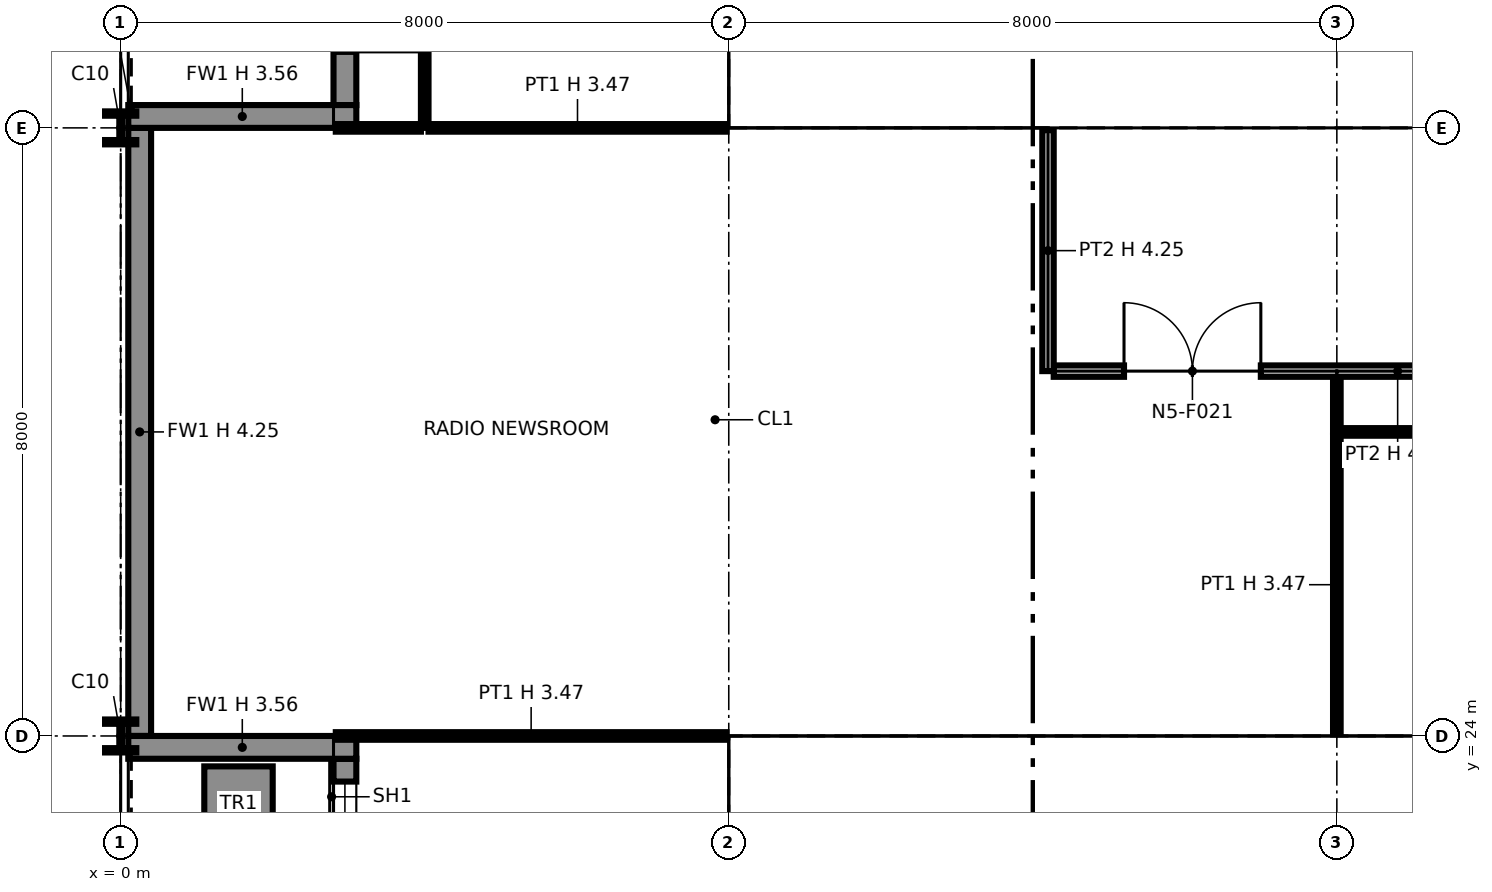
"""IFC4 building model, lengths in metres.
Left out: names, types, materials, properties, quantities, classifications, styles, units other than length and angle.
Written with IfcOpenShell. Run it as: python <this file> out.ifc"""

import sys

from ifc_helpers import new_model, si_unit, direction, frame, frame_2d, origin, origin_2d, place, context, subcontext, project, spatial, polyline, rectangle, i_section, outline, extrude, element, fill, save


model = new_model("IFC4")
c1 = context("Model", 3, precision=1e-05, world=origin(), true_north=direction((0.0, 1.0)))
c2 = subcontext(c1, "Body", "Model", "MODEL_VIEW")
j1 = project(units=[si_unit("LENGTHUNIT", "METRE"), si_unit("PLANEANGLEUNIT", "RADIAN")], contexts=[c1])
p1 = place(None, origin())
s1 = spatial("IfcSite", under=j1, at=p1, CompositionType="ELEMENT")
p2 = place(p1, origin())
s2 = spatial("IfcBuilding", under=s1, at=p2, CompositionType="ELEMENT")
p3 = place(p2, frame((0.0, 0.0, 92.0)))
s3 = spatial("IfcBuildingStorey", under=s2, at=p3, CompositionType="ELEMENT", Elevation=92.0)
for number, where, z_axis, x_axis in (
    (1, (0.0, 24.0, 0.0), (0.0, 0.0, 1.0), (1.0, 0.0, 0.0)),
    (2, (0.0, 32.0, 0.0), (0.0, 0.0, 1.0), (1.0, 0.0, 0.0)),
    (3, (8.0, 24.0, 0.0), (0.0, 0.0, 1.0), (1.0, 0.0, 0.0)),
):
    element("IfcColumn", number, at=place(p3, frame(where, z_axis=z_axis, x_axis=x_axis)), inside=s3, PredefinedType="COLUMN", context=c2, shape_type="SweptSolid", body=[
        extrude(i_section(OverallWidth=0.411, OverallDepth=0.434, WebThickness=0.036, FlangeThickness=0.057, at=origin_2d()), origin(), (0.0, 0.0, 1.0), 4.25),
    ])
p4 = place(p3, frame((8.0, 32.0, 0.0), z_axis=(0.0, 0.0, 1.0), x_axis=(1.0, 0.0, 0.0)))
e4 = element("IfcColumn", 4, at=p4, inside=s3, PredefinedType="COLUMN", context=c2, shape_type="SweptSolid", body=[
    extrude(i_section(OverallWidth=0.394, OverallDepth=0.376, WebThickness=0.017, FlangeThickness=0.028, at=origin_2d()), origin(), (0.0, 0.0, 1.0), 4.25),
])
p5 = place(p3, frame((16.0, 24.0, 0.0), z_axis=(0.0, 0.0, 1.0), x_axis=(1.0, 0.0, 0.0)))
e5 = element("IfcColumn", 5, at=p5, inside=s3, PredefinedType="COLUMN", context=c2, shape_type="SweptSolid", body=[
    extrude(i_section(OverallWidth=0.411, OverallDepth=0.434, WebThickness=0.036, FlangeThickness=0.057, at=origin_2d()), origin(), (0.0, 0.0, 1.0), 4.25),
])
p6 = place(p3, frame((16.0, 32.0, 0.0), z_axis=(0.0, 0.0, 1.0), x_axis=(1.0, 0.0, 0.0)))
e6 = element("IfcColumn", 6, at=p6, inside=s3, PredefinedType="COLUMN", context=c2, shape_type="SweptSolid", body=[
    extrude(i_section(OverallWidth=0.394, OverallDepth=0.376, WebThickness=0.017, FlangeThickness=0.028, at=origin_2d()), origin(), (0.0, 0.0, 1.0), 4.25),
])
p7 = place(p3, frame((2.95, 39.7, 0.0), z_axis=(0.0, 0.0, 1.0), x_axis=(0.0, -1.0, 0.0)))
e7 = element("IfcWall", 7, at=p7, inside=s3, PredefinedType="SOLIDWALL", context=c2, shape_type="SweptSolid", body=[
    extrude(rectangle(XDim=7.4, YDim=0.3, at=frame_2d((3.7, 0.0))), origin(), (0.0, 0.0, 1.0), 4.25),
])
p8 = place(p7, frame((0.3, 0.0, 0.9)))
e8 = element("IfcOpeningElement", 8, at=p8, cuts=e7, PredefinedType="OPENING", context=c2, shape_type="SweptSolid", body=[
    extrude(rectangle(XDim=2.8, YDim=2.2, at=frame_2d((1.4, 1.1))), frame((0.0, 0.16, 0.0), z_axis=(0.0, -1.0, 0.0), x_axis=(1.0, 0.0, 0.0)), (0.0, 0.0, 1.0), 0.32),
])
p9 = place(p7, frame((4.7, 0.0, 0.0)))
e9 = element("IfcOpeningElement", 9, at=p9, cuts=e7, PredefinedType="OPENING", context=c2, shape_type="SweptSolid", body=[
    extrude(rectangle(XDim=2.0, YDim=2.4, at=frame_2d((1.0, 1.2))), frame((0.0, 0.16, 0.0), z_axis=(0.0, -1.0, 0.0), x_axis=(1.0, 0.0, 0.0)), (0.0, 0.0, 1.0), 0.32),
])
p10 = place(p3, frame((0.1, 32.15, 0.0), z_axis=(0.0, 0.0, 1.0), x_axis=(1.0, 0.0, 0.0)))
e10 = element("IfcWall", 10, at=p10, inside=s3, PredefinedType="SOLIDWALL", context=c2, shape_type="SweptSolid", body=[
    extrude(rectangle(XDim=3.0, YDim=0.3, at=frame_2d((1.5, 0.0))), origin(), (0.0, 0.0, 1.0), 3.556),
])
p11 = place(p3, frame((0.25, 32.0, 0.0), z_axis=(0.0, 0.0, 1.0), x_axis=(0.0, -1.0, 0.0)))
e11 = element("IfcWall", 11, at=p11, inside=s3, PredefinedType="SOLIDWALL", context=c2, shape_type="SweptSolid", body=[
    extrude(rectangle(XDim=8.0, YDim=0.3, at=frame_2d((4.0, 0.0))), origin(), (0.0, 0.0, 1.0), 4.25),
])
p12 = place(p3, frame((2.95, 23.7, 0.0), z_axis=(0.0, 0.0, 1.0), x_axis=(0.0, -1.0, 0.0)))
e12 = element("IfcWall", 12, at=p12, inside=s3, PredefinedType="SOLIDWALL", context=c2, shape_type="SweptSolid", body=[
    extrude(rectangle(XDim=7.4, YDim=0.3, at=frame_2d((3.7, 0.0))), origin(), (0.0, 0.0, 1.0), 4.25),
])
p13 = place(p12, frame((0.3, 0.0, 0.9)))
e13 = element("IfcOpeningElement", 13, at=p13, cuts=e12, PredefinedType="OPENING", context=c2, shape_type="SweptSolid", body=[
    extrude(rectangle(XDim=2.8, YDim=2.2, at=frame_2d((1.4, 1.1))), frame((0.0, 0.16, 0.0), z_axis=(0.0, -1.0, 0.0), x_axis=(1.0, 0.0, 0.0)), (0.0, 0.0, 1.0), 0.32),
])
p14 = place(p12, frame((4.7, 0.0, 0.0)))
e14 = element("IfcOpeningElement", 14, at=p14, cuts=e12, PredefinedType="OPENING", context=c2, shape_type="SweptSolid", body=[
    extrude(rectangle(XDim=2.0, YDim=2.4, at=frame_2d((1.0, 1.2))), frame((0.0, 0.16, 0.0), z_axis=(0.0, -1.0, 0.0), x_axis=(1.0, 0.0, 0.0)), (0.0, 0.0, 1.0), 0.32),
])
p15 = place(p3, frame((0.1, 23.85, 0.0), z_axis=(0.0, 0.0, 1.0), x_axis=(1.0, 0.0, 0.0)))
e15 = element("IfcWall", 15, at=p15, inside=s3, PredefinedType="SOLIDWALL", context=c2, shape_type="SweptSolid", body=[
    extrude(rectangle(XDim=3.0, YDim=0.3, at=frame_2d((1.5, 0.0))), origin(), (0.0, 0.0, 1.0), 3.556),
])
p16 = place(p3, frame((1.55, 23.6, 0.0), z_axis=(0.0, 0.0, 1.0), x_axis=(0.0, -1.0, 0.0)))
e16 = element("IfcWall", 16, at=p16, inside=s3, PredefinedType="SOLIDWALL", context=c2, shape_type="SweptSolid", body=[
    extrude(rectangle(XDim=3.2, YDim=0.9, at=frame_2d((1.6, 0.0))), origin(), (0.0, 0.0, 1.0), 0.6),
])
p17 = place(p3, frame((8.75, 8.85, 0.0), z_axis=(0.0, 0.0, 1.0), x_axis=(0.0, 1.0, 0.0)))
e17 = element("IfcWall", 17, at=p17, inside=s3, PredefinedType="PARTITIONING", context=c2, shape_type="SweptSolid", body=[
    extrude(outline(polyline([(0.0, 0.0), (14.3, 0.0), (14.3, 4.25), (10.231, 4.25), (10.23, 3.789), (10.07, 3.789), (10.069, 4.25), (7.27, 4.25), (7.269, 3.632), (7.031, 3.632), (7.031, 4.25), (0.0, 4.25), (0.0, 0.0)])), frame((0.0, 0.1, 0.0), z_axis=(0.0, -1.0, 0.0), x_axis=(1.0, 0.0, 0.0)), (0.0, 0.0, 1.0), 0.2),
])
p18 = place(p17, frame((8.3, 0.0, 0.0)))
e18 = element("IfcOpeningElement", 18, at=p18, cuts=e17, PredefinedType="OPENING", context=c2, shape_type="SweptSolid", body=[
    extrude(rectangle(XDim=1.8, YDim=2.1, at=frame_2d((0.9, 1.05))), frame((0.0, 0.11, 0.0), z_axis=(0.0, -1.0, 0.0), x_axis=(1.0, 0.0, 0.0)), (0.0, 0.0, 1.0), 0.22),
])
p19 = place(p3, frame((8.65, 23.25, 0.0), z_axis=(0.0, 0.0, 1.0), x_axis=(1.0, 0.0, 0.0)))
e19 = element("IfcWall", 19, at=p19, inside=s3, PredefinedType="PARTITIONING", context=c2, shape_type="SweptSolid", body=[
    extrude(outline(polyline([(0.0, 0.0), (14.7, 0.0), (14.7, 4.25), (7.469, 4.25), (7.469, 3.632), (7.231, 3.632), (7.23, 4.25), (0.0, 4.25), (0.0, 0.0)])), frame((0.0, 0.1, 0.0), z_axis=(0.0, -1.0, 0.0), x_axis=(1.0, 0.0, 0.0)), (0.0, 0.0, 1.0), 0.2),
])
for number, where, z_axis, x_axis in (
    (20, (11.6, 20.0, 0.0), (0.0, 0.0, 1.0), (0.0, 1.0, 0.0)),
    (21, (14.3, 20.0, 0.0), (0.0, 0.0, 1.0), (0.0, 1.0, 0.0)),
):
    element("IfcWall", number, at=place(p3, frame(where, z_axis=z_axis, x_axis=x_axis)), inside=s3, PredefinedType="PARTITIONING", context=c2, shape_type="SweptSolid", body=[
        extrude(rectangle(XDim=3.15, YDim=0.2, at=frame_2d((1.575, 0.0))), origin(), (0.0, 0.0, 1.0), 4.25),
    ])
p20 = place(p3, frame((16.975, 20.0, 0.0), z_axis=(0.0, 0.0, 1.0), x_axis=(0.0, 1.0, 0.0)))
e22 = element("IfcWall", 22, at=p20, inside=s3, PredefinedType="PARTITIONING", context=c2, shape_type="SweptSolid", body=[
    extrude(outline(polyline([(0.0, 0.0), (3.15, 0.0), (3.15, 4.25), (0.082, 4.25), (0.081, 3.789), (0.0, 3.789), (0.0, 0.0)])), frame((0.0, 0.075, 0.0), z_axis=(0.0, -1.0, 0.0), x_axis=(1.0, 0.0, 0.0)), (0.0, 0.0, 1.0), 0.15),
])
p21 = place(p3, frame((8.65, 32.75, 0.0), z_axis=(0.0, 0.0, 1.0), x_axis=(1.0, 0.0, 0.0)))
e23 = element("IfcWall", 23, at=p21, inside=s3, PredefinedType="PARTITIONING", context=c2, shape_type="SweptSolid", body=[
    extrude(outline(polyline([(0.0, 0.0), (14.7, 0.0), (14.7, 4.25), (7.469, 4.25), (7.469, 3.632), (7.231, 3.632), (7.23, 4.25), (0.0, 4.25), (0.0, 0.0)])), frame((0.0, 0.1, 0.0), z_axis=(0.0, -1.0, 0.0), x_axis=(1.0, 0.0, 0.0)), (0.0, 0.0, 1.0), 0.2),
])
p22 = place(p21, frame((4.05, 0.0, 0.0)))
e24 = element("IfcOpeningElement", 24, at=p22, cuts=e23, PredefinedType="OPENING", context=c2, shape_type="SweptSolid", body=[
    extrude(rectangle(XDim=1.8, YDim=2.1, at=frame_2d((0.9, 1.05))), frame((0.0, 0.11, 0.0), z_axis=(0.0, -1.0, 0.0), x_axis=(1.0, 0.0, 0.0)), (0.0, 0.0, 1.0), 0.22),
])
p23 = place(p21, frame((8.35, 0.0, 0.0)))
e25 = element("IfcOpeningElement", 25, at=p23, cuts=e23, PredefinedType="OPENING", context=c2, shape_type="SweptSolid", body=[
    extrude(rectangle(XDim=1.4, YDim=2.1, at=frame_2d((0.7, 1.05))), frame((0.0, 0.11, 0.0), z_axis=(0.0, -1.0, 0.0), x_axis=(1.0, 0.0, 0.0)), (0.0, 0.0, 1.0), 0.22),
])
p24 = place(p21, frame((10.85, 0.0, 0.0)))
e26 = element("IfcOpeningElement", 26, at=p24, cuts=e23, PredefinedType="OPENING", context=c2, shape_type="SweptSolid", body=[
    extrude(rectangle(XDim=1.4, YDim=2.1, at=frame_2d((0.7, 1.05))), frame((0.0, 0.11, 0.0), z_axis=(0.0, -1.0, 0.0), x_axis=(1.0, 0.0, 0.0)), (0.0, 0.0, 1.0), 0.22),
])
p25 = place(p3, frame((8.75, 32.85, 0.0), z_axis=(0.0, 0.0, 1.0), x_axis=(0.0, 1.0, 0.0)))
e27 = element("IfcWall", 27, at=p25, inside=s3, PredefinedType="PARTITIONING", context=c2, shape_type="SweptSolid", body=[
    extrude(outline(polyline([(0.0, 0.0), (6.3, 0.0), (6.3, 4.25), (3.231, 4.25), (3.23, 3.789), (3.07, 3.789), (3.069, 4.25), (0.0, 4.25), (0.0, 0.0)])), frame((0.0, 0.1, 0.0), z_axis=(0.0, -1.0, 0.0), x_axis=(1.0, 0.0, 0.0)), (0.0, 0.0, 1.0), 0.2),
])
p26 = place(p3, frame((16.0, 32.85, 0.0), z_axis=(0.0, 0.0, 1.0), x_axis=(0.0, 1.0, 0.0)))
e28 = element("IfcWall", 28, at=p26, inside=s3, PredefinedType="PARTITIONING", context=c2, shape_type="SweptSolid", body=[
    extrude(rectangle(XDim=1.95, YDim=0.6, at=frame_2d((0.975, 0.0))), origin(), (0.0, 0.0, 1.0), 3.632),
])
p27 = place(p3, frame((2.83, 24.0, 0.0), z_axis=(0.0, 0.0, 1.0), x_axis=(1.0, 0.0, 0.0)))
e29 = element("IfcWall", 29, at=p27, inside=s3, PredefinedType="PARTITIONING", context=c2, shape_type="SweptSolid", body=[
    extrude(rectangle(XDim=5.14, YDim=0.1, at=frame_2d((2.57, 0.0))), origin(), (0.0, 0.0, 1.0), 3.47),
])
p28 = place(p3, frame((16.0, 24.03, 0.0), z_axis=(0.0, 0.0, 1.0), x_axis=(0.0, 1.0, 0.0)))
e30 = element("IfcWall", 30, at=p28, inside=s3, PredefinedType="PARTITIONING", context=c2, shape_type="SweptSolid", body=[
    extrude(rectangle(XDim=3.92, YDim=0.1, at=frame_2d((1.96, 0.0))), origin(), (0.0, 0.0, 1.0), 3.47),
])
p29 = place(p3, frame((16.05, 28.0, 0.0), z_axis=(0.0, 0.0, 1.0), x_axis=(1.0, 0.0, 0.0)))
e31 = element("IfcWall", 31, at=p29, inside=s3, PredefinedType="PARTITIONING", context=c2, shape_type="SweptSolid", body=[
    extrude(rectangle(XDim=4.45, YDim=0.1, at=frame_2d((2.225, 0.0))), origin(), (0.0, 0.0, 1.0), 3.47),
])
p30 = place(p3, frame((16.0, 28.0, 0.0), z_axis=(0.0, 0.0, 1.0), x_axis=(0.0, 1.0, 0.0)))
e32 = element("IfcWall", 32, at=p30, inside=s3, PredefinedType="PARTITIONING", context=c2, shape_type="SweptSolid", body=[
    extrude(rectangle(XDim=0.725, YDim=0.1, at=frame_2d((0.363, 0.0))), origin(), (0.0, 0.0, 1.0), 3.47),
])
p31 = place(p3, frame((12.275, 28.8, 0.0), z_axis=(0.0, 0.0, 1.0), x_axis=(1.0, 0.0, 0.0)))
e33 = element("IfcWall", 33, at=p31, inside=s3, PredefinedType="PARTITIONING", context=c2, shape_type="SweptSolid", body=[
    extrude(rectangle(XDim=9.05, YDim=0.15, at=frame_2d((4.525, 0.0))), origin(), (0.0, 0.0, 1.0), 4.25),
])
p32 = place(p31, frame((0.925, 0.0, 0.0)))
e34 = element("IfcOpeningElement", 34, at=p32, cuts=e33, PredefinedType="OPENING", context=c2, shape_type="SweptSolid", body=[
    extrude(rectangle(XDim=1.8, YDim=2.1, at=frame_2d((0.9, 1.05))), frame((0.0, 0.085, 0.0), z_axis=(0.0, -1.0, 0.0), x_axis=(1.0, 0.0, 0.0)), (0.0, 0.0, 1.0), 0.17),
])
p33 = place(p3, frame((12.2, 28.8, 0.0), z_axis=(0.0, 0.0, 1.0), x_axis=(0.0, 1.0, 0.0)))
e35 = element("IfcWall", 35, at=p33, inside=s3, PredefinedType="PARTITIONING", context=c2, shape_type="SweptSolid", body=[
    extrude(rectangle(XDim=3.17, YDim=0.15, at=frame_2d((1.585, 0.0))), origin(), (0.0, 0.0, 1.0), 4.25),
])
p34 = place(p3, frame((2.83, 32.0, 0.0), z_axis=(0.0, 0.0, 1.0), x_axis=(1.0, 0.0, 0.0)))
e36 = element("IfcWall", 36, at=p34, inside=s3, PredefinedType="PARTITIONING", context=c2, shape_type="SweptSolid", body=[
    extrude(rectangle(XDim=1.12, YDim=0.1, at=frame_2d((0.56, 0.0))), origin(), (0.0, 0.0, 1.0), 3.47),
])
p35 = place(p3, frame((4.05, 32.0, 0.0), z_axis=(0.0, 0.0, 1.0), x_axis=(1.0, 0.0, 0.0)))
e37 = element("IfcWall", 37, at=p35, inside=s3, PredefinedType="PARTITIONING", context=c2, shape_type="SweptSolid", body=[
    extrude(rectangle(XDim=3.92, YDim=0.1, at=frame_2d((1.96, 0.0))), origin(), (0.0, 0.0, 1.0), 3.47),
])
p36 = place(p3, frame((4.0, 32.0, 0.0), z_axis=(0.0, 0.0, 1.0), x_axis=(0.0, 1.0, 0.0)))
e38 = element("IfcWall", 38, at=p36, inside=s3, PredefinedType="PARTITIONING", context=c2, shape_type="SweptSolid", body=[
    extrude(outline(polyline([(0.0, 0.0), (11.87, 0.0), (11.87, 4.25), (8.3, 4.25), (8.298, 3.47), (7.702, 3.47), (7.7, 4.25), (4.3, 4.25), (4.298, 3.47), (3.702, 3.47), (3.7, 4.25), (0.0, 4.25), (0.0, 0.0)])), frame((0.0, 0.05, 0.0), z_axis=(0.0, -1.0, 0.0), x_axis=(1.0, 0.0, 0.0)), (0.0, 0.0, 1.0), 0.1),
])
p37 = place(p36, frame((5.45, 0.0, 0.0)))
e39 = element("IfcOpeningElement", 39, at=p37, cuts=e38, PredefinedType="OPENING", context=c2, shape_type="SweptSolid", body=[
    extrude(rectangle(XDim=1.0, YDim=2.1, at=frame_2d((0.5, 1.05))), frame((0.0, 0.06, 0.0), z_axis=(0.0, -1.0, 0.0), x_axis=(1.0, 0.0, 0.0)), (0.0, 0.0, 1.0), 0.12),
])
p38 = place(p13, origin())
e40 = element("IfcWindow", 40, at=p38, inside=s3, PartitioningType="SINGLE_PANEL", PredefinedType="WINDOW", context=c2, shape_type="SweptSolid", body=[
    extrude(rectangle(XDim=2.8, YDim=2.2, at=frame_2d((1.4, 1.1))), frame((0.0, 0.03, 0.0), z_axis=(0.0, -1.0, 0.0), x_axis=(1.0, 0.0, 0.0)), (0.0, 0.0, 1.0), 0.06),
])
fill(e13, e40)
p39 = place(p22, origin())
e41 = element("IfcDoor", 41, at=p39, inside=s3, OperationType="DOUBLE_DOOR_SINGLE_SWING", PredefinedType="NOTDEFINED", context=c2, shape_type="SweptSolid", body=[
    extrude(rectangle(XDim=1.8, YDim=2.1, at=frame_2d((0.9, 1.05))), frame((0.0, 0.025, 0.0), z_axis=(0.0, -1.0, 0.0), x_axis=(1.0, 0.0, 0.0)), (0.0, 0.0, 1.0), 0.05),
])
fill(e24, e41)
p40 = place(p32, origin())
e42 = element("IfcDoor", 42, at=p40, inside=s3, OperationType="DOUBLE_DOOR_SINGLE_SWING", PredefinedType="DOOR", context=c2, shape_type="SweptSolid", body=[
    extrude(rectangle(XDim=1.8, YDim=2.1, at=frame_2d((0.9, 1.05))), frame((0.0, 0.025, 0.0), z_axis=(0.0, -1.0, 0.0), x_axis=(1.0, 0.0, 0.0)), (0.0, 0.0, 1.0), 0.05),
])
fill(e34, e42)
save(model, sys.argv[1])
